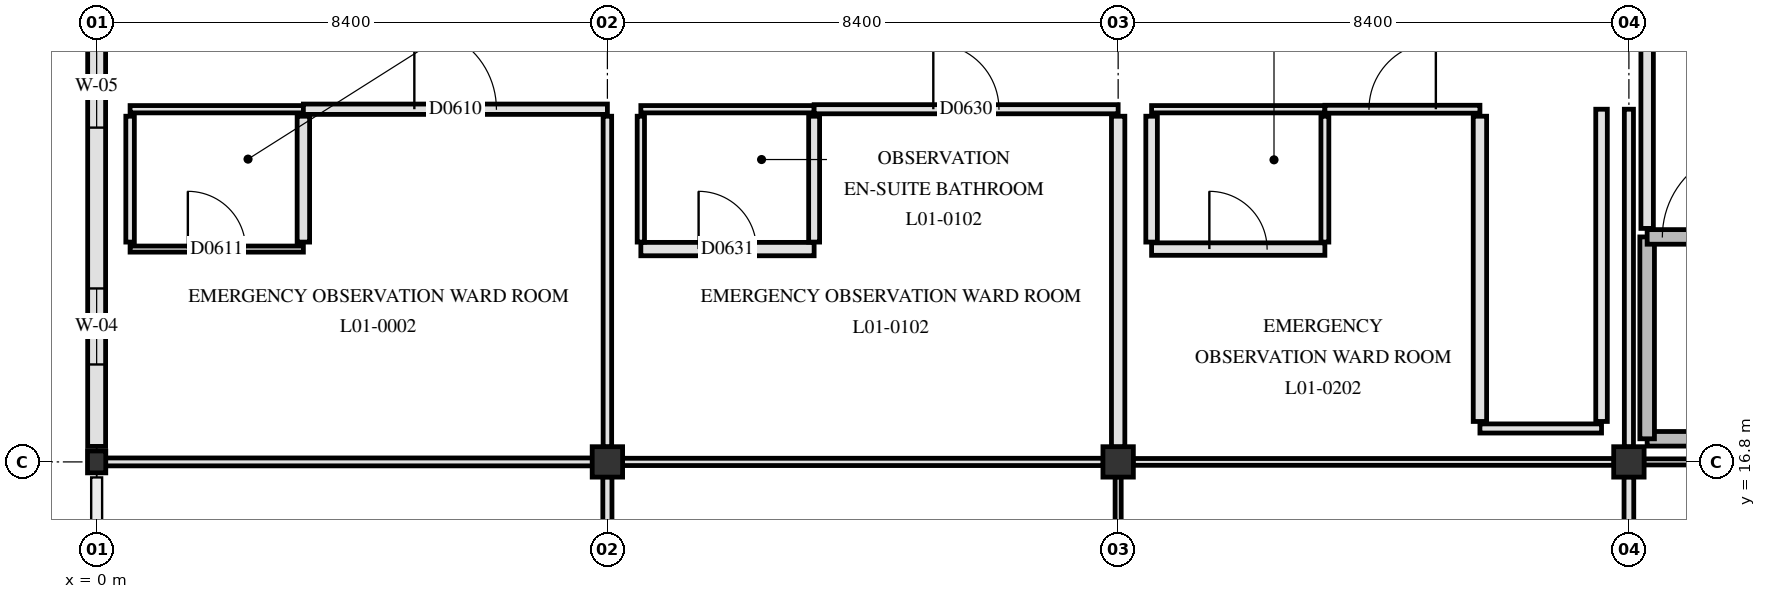
"""IFC4 building model, lengths in metres.
Left out: names, types, materials, properties, quantities, classifications, styles, units other than length and angle.
Written with IfcOpenShell. Run it as: python <this file> out.ifc"""

import sys

from ifc_helpers import new_model, si_unit, direction, frame, frame_2d, origin, origin_2d, place, context, subcontext, project, spatial, rectangle, i_section, extrude, element, fill, save


model = new_model("IFC4")
c1 = context("Model", 3, precision=1e-05, world=origin(), true_north=direction((0.0, 1.0)))
c2 = subcontext(c1, "Body", "Model", "MODEL_VIEW")
j1 = project(units=[si_unit("LENGTHUNIT", "METRE"), si_unit("PLANEANGLEUNIT", "RADIAN")], contexts=[c1])
p1 = place(None, origin())
s1 = spatial("IfcSite", under=j1, at=p1, CompositionType="ELEMENT")
p2 = place(p1, origin())
s2 = spatial("IfcBuilding", under=s1, at=p2, CompositionType="ELEMENT")
p3 = place(p2, frame((0.0, 0.0, 4.8)))
s3 = spatial("IfcBuildingStorey", under=s2, at=p3, CompositionType="ELEMENT", Elevation=4.8)
p4 = place(p3, frame((0.0, 16.8, 0.0), z_axis=(0.0, 0.0, 1.0), x_axis=(1.0, 0.0, 0.0)))
e1 = element("IfcColumn", 1, at=p4, inside=s3, PredefinedType="COLUMN", context=c2, shape_type="SweptSolid", body=[
    extrude(i_section(OverallWidth=0.3, OverallDepth=0.36, WebThickness=0.012, FlangeThickness=0.022, FilletRadius=0.027, at=origin_2d()), origin(), (0.0, 0.0, 1.0), 4.5),
])
for number, where, z_axis, x_axis in (
    (2, (8.4, 16.8, 0.0), (0.0, 0.0, 1.0), (1.0, 0.0, 0.0)),
    (3, (16.8, 16.8, 0.0), (0.0, 0.0, 1.0), (1.0, 0.0, 0.0)),
    (4, (25.2, 16.8, 0.0), (0.0, 0.0, 1.0), (1.0, 0.0, 0.0)),
):
    element("IfcColumn", number, at=place(p3, frame(where, z_axis=z_axis, x_axis=x_axis)), inside=s3, PredefinedType="COLUMN", context=c2, shape_type="SweptSolid", body=[
        extrude(rectangle(XDim=0.5, YDim=0.5, at=origin_2d()), origin(), (0.0, 0.0, 1.0), 4.5),
    ])
p5 = place(p3, frame((0.0, 17.055, 0.0), z_axis=(0.0, 0.0, 1.0), x_axis=(0.0, 1.0, 0.0)))
e5 = element("IfcWall", 5, at=p5, inside=s3, PredefinedType="SOLIDWALL", context=c2, shape_type="SweptSolid", body=[
    extrude(rectangle(XDim=7.89, YDim=0.295, at=frame_2d((3.945, 0.0))), origin(), (0.0, 0.0, 1.0), 3.44),
])
p6 = place(p5, frame((1.347, 0.0, 0.85)))
e6 = element("IfcOpeningElement", 6, at=p6, cuts=e5, PredefinedType="OPENING", context=c2, shape_type="SweptSolid", body=[
    extrude(rectangle(XDim=1.25, YDim=1.3, at=frame_2d((0.625, 0.65))), frame((0.0, 0.157, 0.0), z_axis=(0.0, -1.0, 0.0), x_axis=(1.0, 0.0, 0.0)), (0.0, 0.0, 1.0), 0.315),
])
p7 = place(p5, frame((5.242, 0.0, 0.85)))
e7 = element("IfcOpeningElement", 7, at=p7, cuts=e5, PredefinedType="OPENING", context=c2, shape_type="SweptSolid", body=[
    extrude(rectangle(XDim=1.35, YDim=1.3, at=frame_2d((0.675, 0.65))), frame((0.0, 0.157, 0.0), z_axis=(0.0, -1.0, 0.0), x_axis=(1.0, 0.0, 0.0)), (0.0, 0.0, 1.0), 0.315),
])
p8 = place(p3, frame((25.5, 17.18, 0.0), z_axis=(0.0, 0.0, 1.0), x_axis=(1.0, 0.0, 0.0)))
e8 = element("IfcWall", 8, at=p8, inside=s3, PredefinedType="SHEAR", context=c2, shape_type="SweptSolid", body=[
    extrude(rectangle(XDim=7.82, YDim=0.24, at=frame_2d((3.91, 0.0))), origin(), (0.0, 0.0, 1.0), 4.15),
])
p9 = place(p3, frame((25.5, 17.18, 0.0), z_axis=(0.0, 0.0, 1.0), x_axis=(0.0, 1.0, 0.0)))
e9 = element("IfcWall", 9, at=p9, inside=s3, PredefinedType="SHEAR", context=c2, shape_type="SweptSolid", body=[
    extrude(rectangle(XDim=3.32, YDim=0.24, at=frame_2d((1.66, 0.0))), origin(), (0.0, 0.0, 1.0), 4.15),
])
p10 = place(p3, frame((25.5, 20.5, 0.0), z_axis=(0.0, 0.0, 1.0), x_axis=(1.0, 0.0, 0.0)))
e10 = element("IfcWall", 10, at=p10, inside=s3, PredefinedType="SHEAR", context=c2, shape_type="SweptSolid", body=[
    extrude(rectangle(XDim=7.82, YDim=0.24, at=frame_2d((3.91, 0.0))), origin(), (0.0, 0.0, 1.0), 4.15),
])
p11 = place(p10, frame((0.25, 0.0, 0.0)))
e11 = element("IfcOpeningElement", 11, at=p11, cuts=e10, PredefinedType="OPENING", context=c2, shape_type="SweptSolid", body=[
    extrude(rectangle(XDim=1.45, YDim=2.2, at=frame_2d((0.725, 1.1))), frame((0.0, 0.13, 0.0), z_axis=(0.0, -1.0, 0.0), x_axis=(1.0, 0.0, 0.0)), (0.0, 0.0, 1.0), 0.26),
])
p12 = place(p3, frame((25.5, 20.64, 0.0), z_axis=(0.0, 0.0, 1.0), x_axis=(0.0, 1.0, 0.0)))
e12 = element("IfcWall", 12, at=p12, inside=s3, PredefinedType="PARTITIONING", context=c2, shape_type="SweptSolid", body=[
    extrude(rectangle(XDim=4.12, YDim=0.205, at=frame_2d((2.06, 0.0))), origin(), (0.0, 0.0, 1.0), 3.59),
])
p13 = place(p3, frame((0.145, 16.8, 0.0), z_axis=(0.0, 0.0, 1.0), x_axis=(1.0, 0.0, 0.0)))
e13 = element("IfcWall", 13, at=p13, inside=s3, PredefinedType="PARTITIONING", context=c2, shape_type="SweptSolid", body=[
    extrude(rectangle(XDim=8.01, YDim=0.13, at=frame_2d((4.005, 0.0))), origin(), (0.0, 0.0, 1.0), 3.54),
])
p14 = place(p3, frame((8.645, 16.8, 0.0), z_axis=(0.0, 0.0, 1.0), x_axis=(1.0, 0.0, 0.0)))
e14 = element("IfcWall", 14, at=p14, inside=s3, PredefinedType="PARTITIONING", context=c2, shape_type="SweptSolid", body=[
    extrude(rectangle(XDim=7.91, YDim=0.12, at=frame_2d((3.955, 0.0))), origin(), (0.0, 0.0, 1.0), 3.54),
])
p15 = place(p3, frame((17.045, 16.8, 0.0), z_axis=(0.0, 0.0, 1.0), x_axis=(1.0, 0.0, 0.0)))
e15 = element("IfcWall", 15, at=p15, inside=s3, PredefinedType="PARTITIONING", context=c2, shape_type="SweptSolid", body=[
    extrude(rectangle(XDim=7.91, YDim=0.112, at=frame_2d((3.955, 0.0))), origin(), (0.0, 0.0, 1.0), 3.54),
])
p16 = place(p3, frame((25.445, 16.8, 0.0), z_axis=(0.0, 0.0, 1.0), x_axis=(1.0, 0.0, 0.0)))
e16 = element("IfcWall", 16, at=p16, inside=s3, PredefinedType="PARTITIONING", context=c2, shape_type="SweptSolid", body=[
    extrude(rectangle(XDim=7.91, YDim=0.1, at=frame_2d((3.955, 0.0))), origin(), (0.0, 0.0, 1.0), 3.54),
])
p17 = place(p3, frame((22.75, 17.35, 0.0), z_axis=(0.0, 0.0, 1.0), x_axis=(1.0, 0.0, 0.0)))
e17 = element("IfcWall", 17, at=p17, inside=s3, PredefinedType="PARTITIONING", context=c2, shape_type="SweptSolid", body=[
    extrude(rectangle(XDim=2.0, YDim=0.15, at=frame_2d((1.0, 0.0))), origin(), (0.0, 0.0, 1.0), 4.14),
])
p18 = place(p3, frame((0.55, 20.3, 0.0), z_axis=(0.0, 0.0, 1.0), x_axis=(1.0, 0.0, 0.0)))
e18 = element("IfcWall", 18, at=p18, inside=s3, PredefinedType="PARTITIONING", context=c2, shape_type="SweptSolid", body=[
    extrude(rectangle(XDim=2.85, YDim=0.1, at=frame_2d((1.425, 0.0))), origin(), (0.0, 0.0, 1.0), 4.14),
])
p19 = place(p18, frame((0.95, 0.0, 0.0)))
e19 = element("IfcOpeningElement", 19, at=p19, cuts=e18, PredefinedType="OPENING", context=c2, shape_type="SweptSolid", body=[
    extrude(rectangle(XDim=0.95, YDim=2.1, at=frame_2d((0.475, 1.05))), frame((0.0, 0.06, 0.0), z_axis=(0.0, -1.0, 0.0), x_axis=(1.0, 0.0, 0.0)), (0.0, 0.0, 1.0), 0.12),
])
p20 = place(p3, frame((8.95, 20.3, 0.0), z_axis=(0.0, 0.0, 1.0), x_axis=(1.0, 0.0, 0.0)))
e20 = element("IfcWall", 20, at=p20, inside=s3, PredefinedType="PARTITIONING", context=c2, shape_type="SweptSolid", body=[
    extrude(rectangle(XDim=2.85, YDim=0.22, at=frame_2d((1.425, 0.0))), origin(), (0.0, 0.0, 1.0), 4.14),
])
p21 = place(p20, frame((0.95, 0.0, 0.0)))
e21 = element("IfcOpeningElement", 21, at=p21, cuts=e20, PredefinedType="OPENING", context=c2, shape_type="SweptSolid", body=[
    extrude(rectangle(XDim=0.95, YDim=2.1, at=frame_2d((0.475, 1.05))), frame((0.0, 0.12, 0.0), z_axis=(0.0, -1.0, 0.0), x_axis=(1.0, 0.0, 0.0)), (0.0, 0.0, 1.0), 0.24),
])
p22 = place(p3, frame((17.35, 20.3, 0.0), z_axis=(0.0, 0.0, 1.0), x_axis=(1.0, 0.0, 0.0)))
e22 = element("IfcWall", 22, at=p22, inside=s3, PredefinedType="PARTITIONING", context=c2, shape_type="SweptSolid", body=[
    extrude(rectangle(XDim=2.85, YDim=0.205, at=frame_2d((1.425, 0.0))), origin(), (0.0, 0.0, 1.0), 4.14),
])
p23 = place(p22, frame((0.95, 0.0, 0.0)))
e23 = element("IfcOpeningElement", 23, at=p23, cuts=e22, PredefinedType="OPENING", context=c2, shape_type="SweptSolid", body=[
    extrude(rectangle(XDim=0.95, YDim=2.1, at=frame_2d((0.475, 1.05))), frame((0.0, 0.113, 0.0), z_axis=(0.0, -1.0, 0.0), x_axis=(1.0, 0.0, 0.0)), (0.0, 0.0, 1.0), 0.225),
])
p24 = place(p3, frame((0.55, 22.6, 0.0), z_axis=(0.0, 0.0, 1.0), x_axis=(1.0, 0.0, 0.0)))
e24 = element("IfcWall", 24, at=p24, inside=s3, PredefinedType="PARTITIONING", context=c2, shape_type="SweptSolid", body=[
    extrude(rectangle(XDim=2.85, YDim=0.12, at=frame_2d((1.425, 0.0))), origin(), (0.0, 0.0, 1.0), 4.14),
])
p25 = place(p3, frame((3.4, 22.6, 0.0), z_axis=(0.0, 0.0, 1.0), x_axis=(1.0, 0.0, 0.0)))
e25 = element("IfcWall", 25, at=p25, inside=s3, PredefinedType="PARTITIONING", context=c2, shape_type="SweptSolid", body=[
    extrude(rectangle(XDim=5.0, YDim=0.17, at=frame_2d((2.5, 0.0))), origin(), (0.0, 0.0, 1.0), 3.59),
])
p26 = place(p25, frame((1.825, 0.0, 0.0)))
e26 = element("IfcOpeningElement", 26, at=p26, cuts=e25, PredefinedType="OPENING", context=c2, shape_type="SweptSolid", body=[
    extrude(rectangle(XDim=1.35, YDim=2.2, at=frame_2d((0.675, 1.1))), frame((0.0, 0.095, 0.0), z_axis=(0.0, -1.0, 0.0), x_axis=(1.0, 0.0, 0.0)), (0.0, 0.0, 1.0), 0.19),
])
p27 = place(p3, frame((8.95, 22.6, 0.0), z_axis=(0.0, 0.0, 1.0), x_axis=(1.0, 0.0, 0.0)))
e27 = element("IfcWall", 27, at=p27, inside=s3, PredefinedType="PARTITIONING", context=c2, shape_type="SweptSolid", body=[
    extrude(rectangle(XDim=2.85, YDim=0.12, at=frame_2d((1.425, 0.0))), origin(), (0.0, 0.0, 1.0), 4.14),
])
p28 = place(p3, frame((11.8, 22.6, 0.0), z_axis=(0.0, 0.0, 1.0), x_axis=(1.0, 0.0, 0.0)))
e28 = element("IfcWall", 28, at=p28, inside=s3, PredefinedType="PARTITIONING", context=c2, shape_type="SweptSolid", body=[
    extrude(rectangle(XDim=5.0, YDim=0.15, at=frame_2d((2.5, 0.0))), origin(), (0.0, 0.0, 1.0), 3.59),
])
p29 = place(p28, frame((1.96, 0.0, 0.0)))
e29 = element("IfcOpeningElement", 29, at=p29, cuts=e28, PredefinedType="OPENING", context=c2, shape_type="SweptSolid", body=[
    extrude(rectangle(XDim=1.08, YDim=2.12, at=frame_2d((0.54, 1.06))), frame((0.0, 0.085, 0.0), z_axis=(0.0, -1.0, 0.0), x_axis=(1.0, 0.0, 0.0)), (0.0, 0.0, 1.0), 0.17),
])
p30 = place(p3, frame((17.35, 22.6, 0.0), z_axis=(0.0, 0.0, 1.0), x_axis=(1.0, 0.0, 0.0)))
e30 = element("IfcWall", 30, at=p30, inside=s3, PredefinedType="PARTITIONING", context=c2, shape_type="SweptSolid", body=[
    extrude(rectangle(XDim=2.85, YDim=0.12, at=frame_2d((1.425, 0.0))), origin(), (0.0, 0.0, 1.0), 4.14),
])
p31 = place(p3, frame((20.2, 22.6, 0.0), z_axis=(0.0, 0.0, 1.0), x_axis=(1.0, 0.0, 0.0)))
e31 = element("IfcWall", 31, at=p31, inside=s3, PredefinedType="PARTITIONING", context=c2, shape_type="SweptSolid", body=[
    extrude(rectangle(XDim=2.55, YDim=0.13, at=frame_2d((1.275, 0.0))), origin(), (0.0, 0.0, 1.0), 4.14),
])
p32 = place(p31, frame((0.725, 0.0, 0.0)))
e32 = element("IfcOpeningElement", 32, at=p32, cuts=e31, PredefinedType="OPENING", context=c2, shape_type="SweptSolid", body=[
    extrude(rectangle(XDim=1.1, YDim=2.15, at=frame_2d((0.55, 1.075))), frame((0.0, 0.075, 0.0), z_axis=(0.0, -1.0, 0.0), x_axis=(1.0, 0.0, 0.0)), (0.0, 0.0, 1.0), 0.15),
])
p33 = place(p3, frame((0.55, 20.415, 0.0), z_axis=(0.0, 0.0, 1.0), x_axis=(0.0, 1.0, 0.0)))
e33 = element("IfcWall", 33, at=p33, inside=s3, PredefinedType="PARTITIONING", context=c2, shape_type="SweptSolid", body=[
    extrude(rectangle(XDim=2.07, YDim=0.14, at=frame_2d((1.035, 0.0))), origin(), (0.0, 0.0, 1.0), 4.14),
])
p34 = place(p3, frame((3.4, 20.415, 0.0), z_axis=(0.0, 0.0, 1.0), x_axis=(0.0, 1.0, 0.0)))
e34 = element("IfcWall", 34, at=p34, inside=s3, PredefinedType="PARTITIONING", context=c2, shape_type="SweptSolid", body=[
    extrude(rectangle(XDim=2.07, YDim=0.205, at=frame_2d((1.035, 0.0))), origin(), (0.0, 0.0, 1.0), 4.14),
])
p35 = place(p3, frame((8.4, 11.115, 0.0), z_axis=(0.0, 0.0, 1.0), x_axis=(0.0, 1.0, 0.0)))
e35 = element("IfcWall", 35, at=p35, inside=s3, PredefinedType="PARTITIONING", context=c2, shape_type="SweptSolid", body=[
    extrude(rectangle(XDim=5.44, YDim=0.15, at=frame_2d((2.72, 0.0))), origin(), (0.0, 0.0, 1.0), 3.59),
])
p36 = place(p3, frame((8.4, 17.045, 0.0), z_axis=(0.0, 0.0, 1.0), x_axis=(0.0, 1.0, 0.0)))
e36 = element("IfcWall", 36, at=p36, inside=s3, PredefinedType="PARTITIONING", context=c2, shape_type="SweptSolid", body=[
    extrude(rectangle(XDim=5.44, YDim=0.14, at=frame_2d((2.72, 0.0))), origin(), (0.0, 0.0, 1.0), 3.59),
])
p37 = place(p3, frame((8.95, 20.415, 0.0), z_axis=(0.0, 0.0, 1.0), x_axis=(0.0, 1.0, 0.0)))
e37 = element("IfcWall", 37, at=p37, inside=s3, PredefinedType="PARTITIONING", context=c2, shape_type="SweptSolid", body=[
    extrude(rectangle(XDim=2.07, YDim=0.12, at=frame_2d((1.035, 0.0))), origin(), (0.0, 0.0, 1.0), 4.14),
])
p38 = place(p3, frame((11.8, 20.415, 0.0), z_axis=(0.0, 0.0, 1.0), x_axis=(0.0, 1.0, 0.0)))
e38 = element("IfcWall", 38, at=p38, inside=s3, PredefinedType="PARTITIONING", context=c2, shape_type="SweptSolid", body=[
    extrude(rectangle(XDim=2.07, YDim=0.18, at=frame_2d((1.035, 0.0))), origin(), (0.0, 0.0, 1.0), 4.14),
])
p39 = place(p3, frame((16.8, 11.115, 0.0), z_axis=(0.0, 0.0, 1.0), x_axis=(0.0, 1.0, 0.0)))
e39 = element("IfcWall", 39, at=p39, inside=s3, PredefinedType="PARTITIONING", context=c2, shape_type="SweptSolid", body=[
    extrude(rectangle(XDim=5.44, YDim=0.1, at=frame_2d((2.72, 0.0))), origin(), (0.0, 0.0, 1.0), 3.59),
])
p40 = place(p3, frame((16.8, 17.045, 0.0), z_axis=(0.0, 0.0, 1.0), x_axis=(0.0, 1.0, 0.0)))
e40 = element("IfcWall", 40, at=p40, inside=s3, PredefinedType="PARTITIONING", context=c2, shape_type="SweptSolid", body=[
    extrude(rectangle(XDim=5.44, YDim=0.22, at=frame_2d((2.72, 0.0))), origin(), (0.0, 0.0, 1.0), 3.59),
])
p41 = place(p3, frame((17.35, 20.415, 0.0), z_axis=(0.0, 0.0, 1.0), x_axis=(0.0, 1.0, 0.0)))
e41 = element("IfcWall", 41, at=p41, inside=s3, PredefinedType="PARTITIONING", context=c2, shape_type="SweptSolid", body=[
    extrude(rectangle(XDim=2.07, YDim=0.19, at=frame_2d((1.035, 0.0))), origin(), (0.0, 0.0, 1.0), 4.14),
])
p42 = place(p3, frame((20.2, 20.415, 0.0), z_axis=(0.0, 0.0, 1.0), x_axis=(0.0, 1.0, 0.0)))
e42 = element("IfcWall", 42, at=p42, inside=s3, PredefinedType="PARTITIONING", context=c2, shape_type="SweptSolid", body=[
    extrude(rectangle(XDim=2.07, YDim=0.13, at=frame_2d((1.035, 0.0))), origin(), (0.0, 0.0, 1.0), 4.14),
])
p43 = place(p3, frame((22.75, 17.465, 0.0), z_axis=(0.0, 0.0, 1.0), x_axis=(0.0, 1.0, 0.0)))
e43 = element("IfcWall", 43, at=p43, inside=s3, PredefinedType="PARTITIONING", context=c2, shape_type="SweptSolid", body=[
    extrude(rectangle(XDim=5.02, YDim=0.22, at=frame_2d((2.51, 0.0))), origin(), (0.0, 0.0, 1.0), 4.14),
])
p44 = place(p3, frame((24.75, 17.465, 0.0), z_axis=(0.0, 0.0, 1.0), x_axis=(0.0, 1.0, 0.0)))
e44 = element("IfcWall", 44, at=p44, inside=s3, PredefinedType="PARTITIONING", context=c2, shape_type="SweptSolid", body=[
    extrude(rectangle(XDim=5.135, YDim=0.19, at=frame_2d((2.567, 0.0))), origin(), (0.0, 0.0, 1.0), 4.14),
])
p45 = place(p3, frame((25.2, 11.115, 0.0), z_axis=(0.0, 0.0, 1.0), x_axis=(0.0, 1.0, 0.0)))
e45 = element("IfcWall", 45, at=p45, inside=s3, PredefinedType="PARTITIONING", context=c2, shape_type="SweptSolid", body=[
    extrude(rectangle(XDim=5.44, YDim=0.16, at=frame_2d((2.72, 0.0))), origin(), (0.0, 0.0, 1.0), 3.59),
])
p46 = place(p3, frame((25.2, 17.045, 0.0), z_axis=(0.0, 0.0, 1.0), x_axis=(0.0, 1.0, 0.0)))
e46 = element("IfcWall", 46, at=p46, inside=s3, PredefinedType="PARTITIONING", context=c2, shape_type="SweptSolid", body=[
    extrude(rectangle(XDim=5.555, YDim=0.15, at=frame_2d((2.778, 0.0))), origin(), (0.0, 0.0, 1.0), 3.59),
])
p47 = place(p6, origin())
e47 = element("IfcWindow", 47, at=p47, inside=s3, PartitioningType="SINGLE_PANEL", PredefinedType="WINDOW", context=c2, shape_type="SweptSolid", body=[
    extrude(rectangle(XDim=1.25, YDim=1.3, at=frame_2d((0.625, 0.65))), frame((0.0, 0.03, 0.0), z_axis=(0.0, -1.0, 0.0), x_axis=(1.0, 0.0, 0.0)), (0.0, 0.0, 1.0), 0.06),
])
fill(e6, e47)
p48 = place(p7, origin())
e48 = element("IfcWindow", 48, at=p48, inside=s3, PartitioningType="SINGLE_PANEL", PredefinedType="WINDOW", context=c2, shape_type="SweptSolid", body=[
    extrude(rectangle(XDim=1.35, YDim=1.3, at=frame_2d((0.675, 0.65))), frame((0.0, 0.03, 0.0), z_axis=(0.0, -1.0, 0.0), x_axis=(1.0, 0.0, 0.0)), (0.0, 0.0, 1.0), 0.06),
])
fill(e7, e48)
p49 = place(p11, origin())
e49 = element("IfcDoor", 49, at=p49, inside=s3, OperationType="SINGLE_SWING_RIGHT", PredefinedType="DOOR", context=c2, shape_type="SweptSolid", body=[
    extrude(rectangle(XDim=1.45, YDim=2.2, at=frame_2d((0.725, 1.1))), frame((0.0, 0.025, 0.0), z_axis=(0.0, -1.0, 0.0), x_axis=(1.0, 0.0, 0.0)), (0.0, 0.0, 1.0), 0.05),
])
fill(e11, e49)
p50 = place(p26, origin())
e50 = element("IfcDoor", 50, at=p50, inside=s3, OperationType="SINGLE_SWING_LEFT", PredefinedType="DOOR", context=c2, shape_type="SweptSolid", body=[
    extrude(rectangle(XDim=1.35, YDim=2.2, at=frame_2d((0.675, 1.1))), frame((0.0, 0.025, 0.0), z_axis=(0.0, -1.0, 0.0), x_axis=(1.0, 0.0, 0.0)), (0.0, 0.0, 1.0), 0.05),
])
fill(e26, e50)
p51 = place(p19, origin())
e51 = element("IfcDoor", 51, at=p51, inside=s3, OperationType="SINGLE_SWING_LEFT", PredefinedType="DOOR", context=c2, shape_type="SweptSolid", body=[
    extrude(rectangle(XDim=0.95, YDim=2.1, at=frame_2d((0.475, 1.05))), frame((0.0, 0.025, 0.0), z_axis=(0.0, -1.0, 0.0), x_axis=(1.0, 0.0, 0.0)), (0.0, 0.0, 1.0), 0.05),
])
fill(e19, e51)
p52 = place(p29, origin())
e52 = element("IfcDoor", 52, at=p52, inside=s3, OperationType="SINGLE_SWING_LEFT", PredefinedType="DOOR", context=c2, shape_type="SweptSolid", body=[
    extrude(rectangle(XDim=1.08, YDim=2.12, at=frame_2d((0.54, 1.06))), frame((0.0, 0.025, 0.0), z_axis=(0.0, -1.0, 0.0), x_axis=(1.0, 0.0, 0.0)), (0.0, 0.0, 1.0), 0.05),
])
fill(e29, e52)
p53 = place(p21, origin())
e53 = element("IfcDoor", 53, at=p53, inside=s3, OperationType="SINGLE_SWING_LEFT", PredefinedType="DOOR", context=c2, shape_type="SweptSolid", body=[
    extrude(rectangle(XDim=0.95, YDim=2.1, at=frame_2d((0.475, 1.05))), frame((0.0, 0.025, 0.0), z_axis=(0.0, -1.0, 0.0), x_axis=(1.0, 0.0, 0.0)), (0.0, 0.0, 1.0), 0.05),
])
fill(e21, e53)
p54 = place(p32, origin())
e54 = element("IfcDoor", 54, at=p54, inside=s3, OperationType="SINGLE_SWING_RIGHT", PredefinedType="DOOR", context=c2, shape_type="SweptSolid", body=[
    extrude(rectangle(XDim=1.1, YDim=2.15, at=frame_2d((0.55, 1.075))), frame((0.0, 0.025, 0.0), z_axis=(0.0, -1.0, 0.0), x_axis=(1.0, 0.0, 0.0)), (0.0, 0.0, 1.0), 0.05),
])
fill(e32, e54)
p55 = place(p23, origin())
e55 = element("IfcDoor", 55, at=p55, inside=s3, OperationType="SINGLE_SWING_LEFT", PredefinedType="DOOR", context=c2, shape_type="SweptSolid", body=[
    extrude(rectangle(XDim=0.95, YDim=2.1, at=frame_2d((0.475, 1.05))), frame((0.0, 0.025, 0.0), z_axis=(0.0, -1.0, 0.0), x_axis=(1.0, 0.0, 0.0)), (0.0, 0.0, 1.0), 0.05),
])
fill(e23, e55)
save(model, sys.argv[1])
